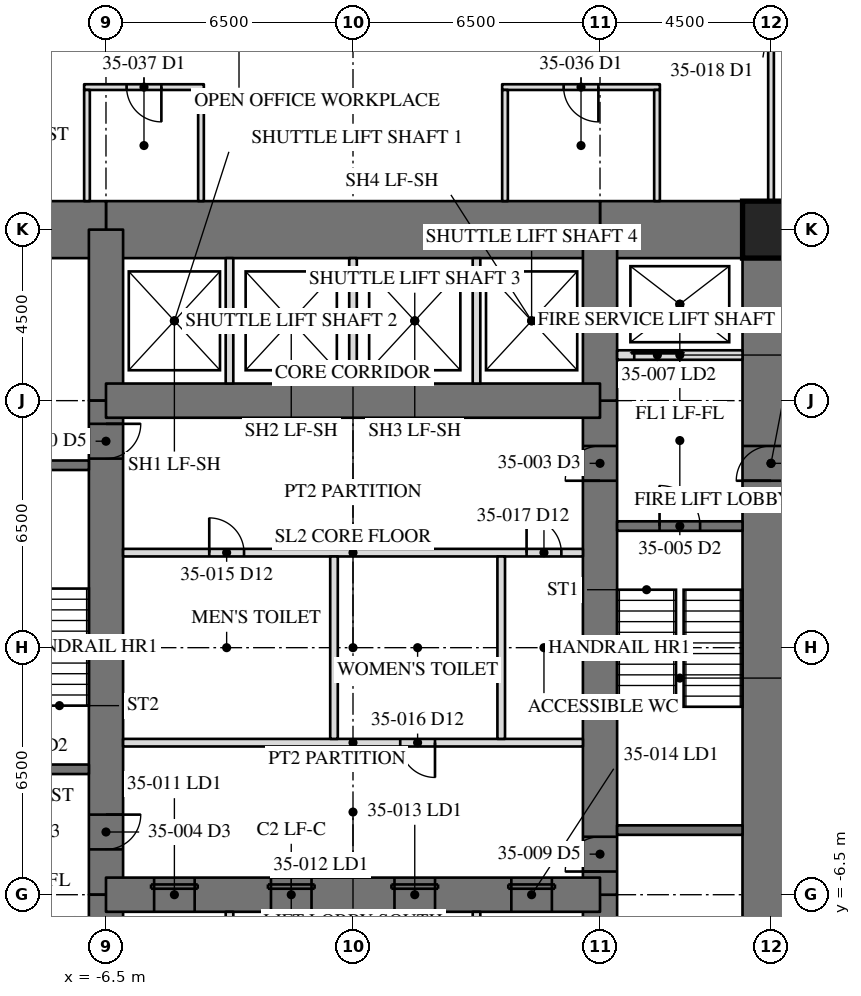
"""IFC4 building model, lengths in metres.
Left out: names, types, materials, properties, quantities, classifications, styles, units other than length and angle.
Written with IfcOpenShell. Run it as: python <this file> out.ifc"""

import sys

from ifc_helpers import new_model, si_unit, direction, frame, frame_2d, origin, origin_2d, place, context, subcontext, project, spatial, rectangle, hollow_rectangle, extrude, element, fill, save


model = new_model("IFC4")
c1 = context("Model", 3, precision=1e-05, world=origin(), true_north=direction((0.0, 1.0)))
c2 = subcontext(c1, "Body", "Model", "MODEL_VIEW")
j1 = project(units=[si_unit("LENGTHUNIT", "METRE"), si_unit("PLANEANGLEUNIT", "RADIAN")], contexts=[c1])
p1 = place(None, origin())
s1 = spatial("IfcSite", under=j1, at=p1, CompositionType="ELEMENT")
p2 = place(p1, origin())
s2 = spatial("IfcBuilding", under=s1, at=p2, CompositionType="ELEMENT")
p3 = place(p2, frame((0.0, 0.0, 150.0)))
s3 = spatial("IfcBuildingStorey", under=s2, at=p3, CompositionType="ELEMENT", Elevation=150.0)
p4 = place(p3, frame((11.0, -11.0, 0.0), z_axis=(0.0, 0.0, 1.0), x_axis=(0.0, 1.0, 0.0)))
e1 = element("IfcWall", 1, at=p4, inside=s3, PredefinedType="SHEAR", context=c2, shape_type="SweptSolid", body=[
    extrude(rectangle(XDim=22.0, YDim=1.5, at=frame_2d((11.0, 0.0))), origin(), (0.0, 0.0, 1.0), 4.1),
])
p5 = place(p4, frame((15.393, 0.0, 0.0)))
e2 = element("IfcOpeningElement", 2, at=p5, cuts=e1, PredefinedType="OPENING", context=c2, shape_type="SweptSolid", body=[
    extrude(rectangle(XDim=0.915, YDim=2.134, at=frame_2d((0.458, 1.067))), frame((0.0, 0.76, 0.0), z_axis=(0.0, -1.0, 0.0), x_axis=(1.0, 0.0, 0.0)), (0.0, 0.0, 1.0), 1.52),
])
p6 = place(p3, frame((11.0, 11.0, 0.0), z_axis=(0.0, 0.0, 1.0), x_axis=(-1.0, 0.0, 0.0)))
e3 = element("IfcWall", 3, at=p6, inside=s3, PredefinedType="SHEAR", context=c2, shape_type="SweptSolid", body=[
    extrude(rectangle(XDim=4.5, YDim=1.5, at=frame_2d((2.25, 0.0))), origin(), (0.0, 0.0, 1.0), 4.1),
])
p7 = place(p3, frame((6.5, 11.0, 0.0), z_axis=(0.0, 0.0, 1.0), x_axis=(-1.0, 0.0, 0.0)))
e4 = element("IfcWall", 4, at=p7, inside=s3, PredefinedType="SHEAR", context=c2, shape_type="SweptSolid", body=[
    extrude(rectangle(XDim=13.0, YDim=1.5, at=frame_2d((6.5, 0.0))), origin(), (0.0, 0.0, 1.0), 4.1),
])
p8 = place(p3, frame((-6.5, 11.0, 0.0), z_axis=(0.0, 0.0, 1.0), x_axis=(-1.0, 0.0, 0.0)))
e5 = element("IfcWall", 5, at=p8, inside=s3, PredefinedType="SHEAR", context=c2, shape_type="SweptSolid", body=[
    extrude(rectangle(XDim=4.5, YDim=1.5, at=frame_2d((2.25, 0.0))), origin(), (0.0, 0.0, 1.0), 4.1),
])
p9 = place(p3, frame((6.5, -11.0, 0.0), z_axis=(0.0, 0.0, 1.0), x_axis=(0.0, 1.0, 0.0)))
e6 = element("IfcWall", 6, at=p9, inside=s3, PredefinedType="SHEAR", context=c2, shape_type="SweptSolid", body=[
    extrude(rectangle(XDim=4.5, YDim=0.9, at=frame_2d((2.25, 0.0))), origin(), (0.0, 0.0, 1.0), 4.1),
])
p10 = place(p3, frame((6.5, -6.5, 0.0), z_axis=(0.0, 0.0, 1.0), x_axis=(0.0, 1.0, 0.0)))
e7 = element("IfcWall", 7, at=p10, inside=s3, PredefinedType="SHEAR", context=c2, shape_type="SweptSolid", body=[
    extrude(rectangle(XDim=13.0, YDim=0.9, at=frame_2d((6.5, 0.0))), origin(), (0.0, 0.0, 1.0), 4.1),
])
p11 = place(p10, frame((10.893, 0.0, 0.0)))
e8 = element("IfcOpeningElement", 8, at=p11, cuts=e7, PredefinedType="OPENING", context=c2, shape_type="SweptSolid", body=[
    extrude(rectangle(XDim=0.915, YDim=2.134, at=frame_2d((0.458, 1.067))), frame((0.0, 0.46, 0.0), z_axis=(0.0, -1.0, 0.0), x_axis=(1.0, 0.0, 0.0)), (0.0, 0.0, 1.0), 0.92),
])
p12 = place(p10, frame((0.61, 0.0, 0.0)))
e9 = element("IfcOpeningElement", 9, at=p12, cuts=e7, PredefinedType="OPENING", context=c2, shape_type="SweptSolid", body=[
    extrude(rectangle(XDim=0.915, YDim=2.134, at=frame_2d((0.458, 1.067))), frame((0.0, 0.46, 0.0), z_axis=(0.0, -1.0, 0.0), x_axis=(1.0, 0.0, 0.0)), (0.0, 0.0, 1.0), 0.92),
])
for number, where, z_axis, x_axis in (
    (10, (6.5, 6.5, 0.0), (0.0, 0.0, 1.0), (0.0, 1.0, 0.0)),
    (11, (-6.5, 11.0, 0.0), (0.0, 0.0, 1.0), (0.0, -1.0, 0.0)),
):
    element("IfcWall", number, at=place(p3, frame(where, z_axis=z_axis, x_axis=x_axis)), inside=s3, PredefinedType="SHEAR", context=c2, shape_type="SweptSolid", body=[
        extrude(rectangle(XDim=4.5, YDim=0.9, at=frame_2d((2.25, 0.0))), origin(), (0.0, 0.0, 1.0), 4.1),
    ])
p13 = place(p3, frame((-6.5, 6.5, 0.0), z_axis=(0.0, 0.0, 1.0), x_axis=(0.0, -1.0, 0.0)))
e12 = element("IfcWall", 12, at=p13, inside=s3, PredefinedType="SHEAR", context=c2, shape_type="SweptSolid", body=[
    extrude(rectangle(XDim=13.0, YDim=0.9, at=frame_2d((6.5, 0.0))), origin(), (0.0, 0.0, 1.0), 4.1),
])
p14 = place(p13, frame((10.893, 0.0, 0.0)))
e13 = element("IfcOpeningElement", 13, at=p14, cuts=e12, PredefinedType="OPENING", context=c2, shape_type="SweptSolid", body=[
    extrude(rectangle(XDim=0.915, YDim=2.134, at=frame_2d((0.458, 1.067))), frame((0.0, 0.46, 0.0), z_axis=(0.0, -1.0, 0.0), x_axis=(1.0, 0.0, 0.0)), (0.0, 0.0, 1.0), 0.92),
])
p15 = place(p13, frame((0.61, 0.0, 0.0)))
e14 = element("IfcOpeningElement", 14, at=p15, cuts=e12, PredefinedType="OPENING", context=c2, shape_type="SweptSolid", body=[
    extrude(rectangle(XDim=0.915, YDim=2.134, at=frame_2d((0.458, 1.067))), frame((0.0, 0.46, 0.0), z_axis=(0.0, -1.0, 0.0), x_axis=(1.0, 0.0, 0.0)), (0.0, 0.0, 1.0), 0.92),
])
p16 = place(p3, frame((-6.5, -6.5, 0.0), z_axis=(0.0, 0.0, 1.0), x_axis=(0.0, -1.0, 0.0)))
e15 = element("IfcWall", 15, at=p16, inside=s3, PredefinedType="SHEAR", context=c2, shape_type="SweptSolid", body=[
    extrude(rectangle(XDim=4.5, YDim=0.9, at=frame_2d((2.25, 0.0))), origin(), (0.0, 0.0, 1.0), 4.1),
])
p17 = place(p3, frame((6.5, 6.5, 0.0), z_axis=(0.0, 0.0, 1.0), x_axis=(-1.0, 0.0, 0.0)))
e16 = element("IfcWall", 16, at=p17, inside=s3, PredefinedType="SHEAR", context=c2, shape_type="SweptSolid", body=[
    extrude(rectangle(XDim=13.0, YDim=0.9, at=frame_2d((6.5, 0.0))), origin(), (0.0, 0.0, 1.0), 4.1),
])
p18 = place(p3, frame((-6.5, -6.5, 0.0), z_axis=(0.0, 0.0, 1.0), x_axis=(1.0, 0.0, 0.0)))
e17 = element("IfcWall", 17, at=p18, inside=s3, PredefinedType="SHEAR", context=c2, shape_type="SweptSolid", body=[
    extrude(rectangle(XDim=13.0, YDim=0.9, at=frame_2d((6.5, 0.0))), origin(), (0.0, 0.0, 1.0), 4.1),
])
p19 = place(p18, frame((1.267, 0.0, 0.0)))
e18 = element("IfcOpeningElement", 18, at=p19, cuts=e17, PredefinedType="OPENING", context=c2, shape_type="SweptSolid", body=[
    extrude(rectangle(XDim=1.067, YDim=2.134, at=frame_2d((0.533, 1.067))), frame((0.0, 0.46, 0.0), z_axis=(0.0, -1.0, 0.0), x_axis=(1.0, 0.0, 0.0)), (0.0, 0.0, 1.0), 0.92),
])
p20 = place(p18, frame((4.342, 0.0, 0.0)))
e19 = element("IfcOpeningElement", 19, at=p20, cuts=e17, PredefinedType="OPENING", context=c2, shape_type="SweptSolid", body=[
    extrude(rectangle(XDim=1.067, YDim=2.134, at=frame_2d((0.533, 1.067))), frame((0.0, 0.46, 0.0), z_axis=(0.0, -1.0, 0.0), x_axis=(1.0, 0.0, 0.0)), (0.0, 0.0, 1.0), 0.92),
])
p21 = place(p18, frame((7.592, 0.0, 0.0)))
e20 = element("IfcOpeningElement", 20, at=p21, cuts=e17, PredefinedType="OPENING", context=c2, shape_type="SweptSolid", body=[
    extrude(rectangle(XDim=1.067, YDim=2.134, at=frame_2d((0.533, 1.067))), frame((0.0, 0.46, 0.0), z_axis=(0.0, -1.0, 0.0), x_axis=(1.0, 0.0, 0.0)), (0.0, 0.0, 1.0), 0.92),
])
p22 = place(p18, frame((10.667, 0.0, 0.0)))
e21 = element("IfcOpeningElement", 21, at=p22, cuts=e17, PredefinedType="OPENING", context=c2, shape_type="SweptSolid", body=[
    extrude(rectangle(XDim=1.067, YDim=2.134, at=frame_2d((0.533, 1.067))), frame((0.0, 0.46, 0.0), z_axis=(0.0, -1.0, 0.0), x_axis=(1.0, 0.0, 0.0)), (0.0, 0.0, 1.0), 0.92),
])
p23 = place(p3, frame((11.0, 11.0, 0.0), z_axis=(0.0, 0.0, 1.0), x_axis=(1.0, 0.0, 0.0)))
e22 = element("IfcColumn", 22, at=p23, inside=s3, PredefinedType="COLUMN", context=c2, shape_type="SweptSolid", body=[
    extrude(hollow_rectangle(XDim=1.499, YDim=1.499, WallThickness=0.102, at=origin_2d()), origin(), (0.0, 0.0, 1.0), 4.1),
])
for number, where, z_axis, x_axis in (
    (23, (6.95, -4.8, 0.0), (0.0, 0.0, 1.0), (1.0, 0.0, 0.0)),
    (24, (-6.95, 4.8, 0.0), (0.0, 0.0, 1.0), (-1.0, 0.0, 0.0)),
):
    element("IfcWall", number, at=place(p3, frame(where, z_axis=z_axis, x_axis=x_axis)), inside=s3, PredefinedType="SOLIDWALL", context=c2, shape_type="SweptSolid", body=[
        extrude(rectangle(XDim=3.3, YDim=0.25, at=frame_2d((1.65, 0.0))), origin(), (0.0, 0.0, 1.0), 3.91),
    ])
p24 = place(p3, frame((6.95, 3.2, 0.0), z_axis=(0.0, 0.0, 1.0), x_axis=(1.0, 0.0, 0.0)))
e25 = element("IfcWall", 25, at=p24, inside=s3, PredefinedType="SOLIDWALL", context=c2, shape_type="SweptSolid", body=[
    extrude(rectangle(XDim=3.3, YDim=0.25, at=frame_2d((1.65, 0.0))), origin(), (0.0, 0.0, 1.0), 3.91),
])
p25 = place(p24, frame((1.116, 0.0, 0.0)))
e26 = element("IfcOpeningElement", 26, at=p25, cuts=e25, PredefinedType="OPENING", context=c2, shape_type="SweptSolid", body=[
    extrude(rectangle(XDim=1.067, YDim=2.134, at=frame_2d((0.533, 1.067))), frame((0.0, 0.135, 0.0), z_axis=(0.0, -1.0, 0.0), x_axis=(1.0, 0.0, 0.0)), (0.0, 0.0, 1.0), 0.27),
])
p26 = place(p3, frame((-6.95, -3.2, 0.0), z_axis=(0.0, 0.0, 1.0), x_axis=(-1.0, 0.0, 0.0)))
e27 = element("IfcWall", 27, at=p26, inside=s3, PredefinedType="SOLIDWALL", context=c2, shape_type="SweptSolid", body=[
    extrude(rectangle(XDim=3.3, YDim=0.25, at=frame_2d((1.65, 0.0))), origin(), (0.0, 0.0, 1.0), 3.91),
])
p27 = place(p26, frame((1.116, 0.0, 0.0)))
e28 = element("IfcOpeningElement", 28, at=p27, cuts=e27, PredefinedType="OPENING", context=c2, shape_type="SweptSolid", body=[
    extrude(rectangle(XDim=1.067, YDim=2.134, at=frame_2d((0.533, 1.067))), frame((0.0, 0.135, 0.0), z_axis=(0.0, -1.0, 0.0), x_axis=(1.0, 0.0, 0.0)), (0.0, 0.0, 1.0), 0.27),
])
p28 = place(p3, frame((6.95, 7.7, 0.0), z_axis=(0.0, 0.0, 1.0), x_axis=(1.0, 0.0, 0.0)))
e29 = element("IfcWall", 29, at=p28, inside=s3, PredefinedType="PARTITIONING", context=c2, shape_type="SweptSolid", body=[
    extrude(rectangle(XDim=3.3, YDim=0.25, at=frame_2d((1.65, 0.0))), origin(), (0.0, 0.0, 1.0), 3.91),
])
p29 = place(p28, frame((0.45, 0.0, 0.0)))
e30 = element("IfcOpeningElement", 30, at=p29, cuts=e29, PredefinedType="OPENING", context=c2, shape_type="SweptSolid", body=[
    extrude(rectangle(XDim=1.219, YDim=2.134, at=frame_2d((0.609, 1.067))), frame((0.0, 0.135, 0.0), z_axis=(0.0, -1.0, 0.0), x_axis=(1.0, 0.0, 0.0)), (0.0, 0.0, 1.0), 0.27),
])
p30 = place(p3, frame((-6.05, 2.5, 0.0), z_axis=(0.0, 0.0, 1.0), x_axis=(1.0, 0.0, 0.0)))
e31 = element("IfcWall", 31, at=p30, inside=s3, PredefinedType="PARTITIONING", context=c2, shape_type="SweptSolid", body=[
    extrude(rectangle(XDim=12.1, YDim=0.2, at=frame_2d((6.05, 0.0))), origin(), (0.0, 0.0, 1.0), 3.91),
])
p31 = place(p30, frame((2.268, 0.0, 0.0)))
e32 = element("IfcOpeningElement", 32, at=p31, cuts=e31, PredefinedType="OPENING", context=c2, shape_type="SweptSolid", body=[
    extrude(rectangle(XDim=0.915, YDim=2.134, at=frame_2d((0.458, 1.067))), frame((0.0, 0.11, 0.0), z_axis=(0.0, -1.0, 0.0), x_axis=(1.0, 0.0, 0.0)), (0.0, 0.0, 1.0), 0.22),
])
p32 = place(p30, frame((10.617, 0.0, 0.0)))
e33 = element("IfcOpeningElement", 33, at=p32, cuts=e31, PredefinedType="OPENING", context=c2, shape_type="SweptSolid", body=[
    extrude(rectangle(XDim=0.915, YDim=2.134, at=frame_2d((0.458, 1.067))), frame((0.0, 0.11, 0.0), z_axis=(0.0, -1.0, 0.0), x_axis=(1.0, 0.0, 0.0)), (0.0, 0.0, 1.0), 0.22),
])
p33 = place(p3, frame((6.05, -2.5, 0.0), z_axis=(0.0, 0.0, 1.0), x_axis=(-1.0, 0.0, 0.0)))
e34 = element("IfcWall", 34, at=p33, inside=s3, PredefinedType="PARTITIONING", context=c2, shape_type="SweptSolid", body=[
    extrude(rectangle(XDim=12.1, YDim=0.2, at=frame_2d((6.05, 0.0))), origin(), (0.0, 0.0, 1.0), 3.91),
])
p34 = place(p33, frame((3.893, 0.0, 0.0)))
e35 = element("IfcOpeningElement", 35, at=p34, cuts=e34, PredefinedType="OPENING", context=c2, shape_type="SweptSolid", body=[
    extrude(rectangle(XDim=0.915, YDim=2.134, at=frame_2d((0.458, 1.067))), frame((0.0, 0.11, 0.0), z_axis=(0.0, -1.0, 0.0), x_axis=(1.0, 0.0, 0.0)), (0.0, 0.0, 1.0), 0.22),
])
for number, where, z_axis, x_axis in (
    (36, (-3.25, 6.95, 0.0), (0.0, 0.0, 1.0), (0.0, 1.0, 0.0)),
    (37, (0.0, 6.95, 0.0), (0.0, 0.0, 1.0), (0.0, 1.0, 0.0)),
    (38, (3.25, 6.95, 0.0), (0.0, 0.0, 1.0), (0.0, 1.0, 0.0)),
    (39, (-3.25, -10.25, 0.0), (0.0, 0.0, 1.0), (0.0, 1.0, 0.0)),
    (40, (0.0, -10.25, 0.0), (0.0, 0.0, 1.0), (0.0, 1.0, 0.0)),
    (41, (3.25, -10.25, 0.0), (0.0, 0.0, 1.0), (0.0, 1.0, 0.0)),
):
    element("IfcWall", number, at=place(p3, frame(where, z_axis=z_axis, x_axis=x_axis)), inside=s3, PredefinedType="PARTITIONING", context=c2, shape_type="SweptSolid", body=[
        extrude(rectangle(XDim=3.3, YDim=0.2, at=frame_2d((1.65, 0.0))), origin(), (0.0, 0.0, 1.0), 3.91),
    ])
for number, where, z_axis, x_axis in (
    (42, (-0.5, -2.4, 0.0), (0.0, 0.0, 1.0), (0.0, 1.0, 0.0)),
    (43, (3.9, -2.4, 0.0), (0.0, 0.0, 1.0), (0.0, 1.0, 0.0)),
):
    element("IfcWall", number, at=place(p3, frame(where, z_axis=z_axis, x_axis=x_axis)), inside=s3, PredefinedType="PARTITIONING", context=c2, shape_type="SweptSolid", body=[
        extrude(rectangle(XDim=4.8, YDim=0.2, at=frame_2d((2.4, 0.0))), origin(), (0.0, 0.0, 1.0), 3.91),
    ])
p35 = place(p3, frame((11.0, 11.75, 0.0), z_axis=(0.0, 0.0, 1.0), x_axis=(0.0, 1.0, 0.0)))
e44 = element("IfcWall", 44, at=p35, inside=s3, PredefinedType="PARTITIONING", context=c2, shape_type="SweptSolid", body=[
    extrude(rectangle(XDim=10.665, YDim=0.15, at=frame_2d((5.333, 0.0))), origin(), (0.0, 0.0, 1.0), 3.326),
])
p36 = place(p35, frame((4.518, 0.0, 0.0)))
e45 = element("IfcOpeningElement", 45, at=p36, cuts=e44, PredefinedType="OPENING", context=c2, shape_type="SweptSolid", body=[
    extrude(rectangle(XDim=0.915, YDim=2.134, at=frame_2d((0.458, 1.067))), frame((0.0, 0.085, 0.0), z_axis=(0.0, -1.0, 0.0), x_axis=(1.0, 0.0, 0.0)), (0.0, 0.0, 1.0), 0.17),
])
p37 = place(p3, frame((8.075, 14.75, 0.0), z_axis=(0.0, 0.0, 1.0), x_axis=(-1.0, 0.0, 0.0)))
e46 = element("IfcWall", 46, at=p37, inside=s3, PredefinedType="PARTITIONING", context=c2, shape_type="SweptSolid", body=[
    extrude(rectangle(XDim=4.15, YDim=0.15, at=frame_2d((2.075, 0.0))), origin(), (0.0, 0.0, 1.0), 3.91),
])
p38 = place(p37, frame((1.617, 0.0, 0.0)))
e47 = element("IfcOpeningElement", 47, at=p38, cuts=e46, PredefinedType="OPENING", context=c2, shape_type="SweptSolid", body=[
    extrude(rectangle(XDim=0.915, YDim=2.134, at=frame_2d((0.458, 1.067))), frame((0.0, 0.085, 0.0), z_axis=(0.0, -1.0, 0.0), x_axis=(1.0, 0.0, 0.0)), (0.0, 0.0, 1.0), 0.17),
])
for number, where, z_axis, x_axis in (
    (48, (8.0, 14.675, 0.0), (0.0, 0.0, 1.0), (0.0, -1.0, 0.0)),
    (49, (4.0, 14.675, 0.0), (0.0, 0.0, 1.0), (0.0, -1.0, 0.0)),
):
    element("IfcWall", number, at=place(p3, frame(where, z_axis=z_axis, x_axis=x_axis)), inside=s3, PredefinedType="PARTITIONING", context=c2, shape_type="SweptSolid", body=[
        extrude(rectangle(XDim=2.925, YDim=0.15, at=frame_2d((1.462, 0.0))), origin(), (0.0, 0.0, 1.0), 3.91),
    ])
p39 = place(p3, frame((-3.925, 14.75, 0.0), z_axis=(0.0, 0.0, 1.0), x_axis=(-1.0, 0.0, 0.0)))
e50 = element("IfcWall", 50, at=p39, inside=s3, PredefinedType="PARTITIONING", context=c2, shape_type="SweptSolid", body=[
    extrude(rectangle(XDim=3.15, YDim=0.15, at=frame_2d((1.575, 0.0))), origin(), (0.0, 0.0, 1.0), 3.91),
])
p40 = place(p39, frame((1.117, 0.0, 0.0)))
e51 = element("IfcOpeningElement", 51, at=p40, cuts=e50, PredefinedType="OPENING", context=c2, shape_type="SweptSolid", body=[
    extrude(rectangle(XDim=0.915, YDim=2.134, at=frame_2d((0.458, 1.067))), frame((0.0, 0.085, 0.0), z_axis=(0.0, -1.0, 0.0), x_axis=(1.0, 0.0, 0.0)), (0.0, 0.0, 1.0), 0.17),
])
for number, where, z_axis, x_axis in (
    (52, (-4.0, 14.675, 0.0), (0.0, 0.0, 1.0), (0.0, -1.0, 0.0)),
    (53, (-7.0, 14.675, 0.0), (0.0, 0.0, 1.0), (0.0, -1.0, 0.0)),
):
    element("IfcWall", number, at=place(p3, frame(where, z_axis=z_axis, x_axis=x_axis)), inside=s3, PredefinedType="PARTITIONING", context=c2, shape_type="SweptSolid", body=[
        extrude(rectangle(XDim=2.925, YDim=0.15, at=frame_2d((1.462, 0.0))), origin(), (0.0, 0.0, 1.0), 3.91),
    ])
p41 = place(p11, origin())
e54 = element("IfcDoor", 54, at=p41, inside=s3, OperationType="SINGLE_SWING_RIGHT", PredefinedType="DOOR", context=c2, shape_type="SweptSolid", body=[
    extrude(rectangle(XDim=0.915, YDim=2.134, at=frame_2d((0.458, 1.067))), frame((0.0, -0.375, 0.0), z_axis=(0.0, -1.0, 0.0), x_axis=(1.0, 0.0, 0.0)), (0.0, 0.0, 1.0), 0.05),
])
fill(e8, e54)
p42 = place(p14, origin())
e55 = element("IfcDoor", 55, at=p42, inside=s3, OperationType="SINGLE_SWING_RIGHT", PredefinedType="DOOR", context=c2, shape_type="SweptSolid", body=[
    extrude(rectangle(XDim=0.915, YDim=2.134, at=frame_2d((0.458, 1.067))), frame((0.0, -0.375, 0.0), z_axis=(0.0, -1.0, 0.0), x_axis=(1.0, 0.0, 0.0)), (0.0, 0.0, 1.0), 0.05),
])
fill(e13, e55)
p43 = place(p25, origin())
e56 = element("IfcDoor", 56, at=p43, inside=s3, OperationType="SINGLE_SWING_LEFT", PredefinedType="DOOR", context=c2, shape_type="SweptSolid", body=[
    extrude(rectangle(XDim=1.067, YDim=2.134, at=frame_2d((0.533, 1.067))), frame((0.0, 0.025, 0.0), z_axis=(0.0, -1.0, 0.0), x_axis=(1.0, 0.0, 0.0)), (0.0, 0.0, 1.0), 0.05),
])
fill(e26, e56)
p44 = place(p29, origin())
e57 = element("IfcDoor", 57, at=p44, inside=s3, OperationType="SLIDING_TO_LEFT", PredefinedType="DOOR", context=c2, shape_type="SweptSolid", body=[
    extrude(rectangle(XDim=1.219, YDim=2.134, at=frame_2d((0.609, 1.067))), frame((0.0, 0.025, 0.0), z_axis=(0.0, -1.0, 0.0), x_axis=(1.0, 0.0, 0.0)), (0.0, 0.0, 1.0), 0.05),
])
fill(e30, e57)
p45 = place(p12, origin())
e58 = element("IfcDoor", 58, at=p45, inside=s3, OperationType="SINGLE_SWING_RIGHT", PredefinedType="DOOR", context=c2, shape_type="SweptSolid", body=[
    extrude(rectangle(XDim=0.915, YDim=2.134, at=frame_2d((0.458, 1.067))), frame((0.0, -0.375, 0.0), z_axis=(0.0, -1.0, 0.0), x_axis=(1.0, 0.0, 0.0)), (0.0, 0.0, 1.0), 0.05),
])
fill(e9, e58)
p46 = place(p15, origin())
e59 = element("IfcDoor", 59, at=p46, inside=s3, OperationType="SINGLE_SWING_RIGHT", PredefinedType="DOOR", context=c2, shape_type="SweptSolid", body=[
    extrude(rectangle(XDim=0.915, YDim=2.134, at=frame_2d((0.458, 1.067))), frame((0.0, -0.375, 0.0), z_axis=(0.0, -1.0, 0.0), x_axis=(1.0, 0.0, 0.0)), (0.0, 0.0, 1.0), 0.05),
])
fill(e14, e59)
p47 = place(p19, origin())
e60 = element("IfcDoor", 60, at=p47, inside=s3, OperationType="SLIDING_TO_LEFT", PredefinedType="DOOR", context=c2, shape_type="SweptSolid", body=[
    extrude(rectangle(XDim=1.067, YDim=2.134, at=frame_2d((0.533, 1.067))), frame((0.0, -0.375, 0.0), z_axis=(0.0, -1.0, 0.0), x_axis=(1.0, 0.0, 0.0)), (0.0, 0.0, 1.0), 0.05),
])
fill(e18, e60)
p48 = place(p20, origin())
e61 = element("IfcDoor", 61, at=p48, inside=s3, OperationType="SLIDING_TO_LEFT", PredefinedType="DOOR", context=c2, shape_type="SweptSolid", body=[
    extrude(rectangle(XDim=1.067, YDim=2.134, at=frame_2d((0.533, 1.067))), frame((0.0, -0.375, 0.0), z_axis=(0.0, -1.0, 0.0), x_axis=(1.0, 0.0, 0.0)), (0.0, 0.0, 1.0), 0.05),
])
fill(e19, e61)
p49 = place(p21, origin())
e62 = element("IfcDoor", 62, at=p49, inside=s3, OperationType="SLIDING_TO_LEFT", PredefinedType="DOOR", context=c2, shape_type="SweptSolid", body=[
    extrude(rectangle(XDim=1.067, YDim=2.134, at=frame_2d((0.533, 1.067))), frame((0.0, -0.375, 0.0), z_axis=(0.0, -1.0, 0.0), x_axis=(1.0, 0.0, 0.0)), (0.0, 0.0, 1.0), 0.05),
])
fill(e20, e62)
p50 = place(p22, origin())
e63 = element("IfcDoor", 63, at=p50, inside=s3, OperationType="SLIDING_TO_LEFT", PredefinedType="DOOR", context=c2, shape_type="SweptSolid", body=[
    extrude(rectangle(XDim=1.067, YDim=2.134, at=frame_2d((0.533, 1.067))), frame((0.0, -0.375, 0.0), z_axis=(0.0, -1.0, 0.0), x_axis=(1.0, 0.0, 0.0)), (0.0, 0.0, 1.0), 0.05),
])
fill(e21, e63)
p51 = place(p31, origin())
e64 = element("IfcDoor", 64, at=p51, inside=s3, OperationType="SINGLE_SWING_LEFT", PredefinedType="DOOR", context=c2, shape_type="SweptSolid", body=[
    extrude(rectangle(XDim=0.915, YDim=2.134, at=frame_2d((0.458, 1.067))), frame((0.0, 0.025, 0.0), z_axis=(0.0, -1.0, 0.0), x_axis=(1.0, 0.0, 0.0)), (0.0, 0.0, 1.0), 0.05),
])
fill(e32, e64)
p52 = place(p34, origin())
e65 = element("IfcDoor", 65, at=p52, inside=s3, OperationType="SINGLE_SWING_LEFT", PredefinedType="DOOR", context=c2, shape_type="SweptSolid", body=[
    extrude(rectangle(XDim=0.915, YDim=2.134, at=frame_2d((0.458, 1.067))), frame((0.0, 0.025, 0.0), z_axis=(0.0, -1.0, 0.0), x_axis=(1.0, 0.0, 0.0)), (0.0, 0.0, 1.0), 0.05),
])
fill(e35, e65)
p53 = place(p32, origin())
e66 = element("IfcDoor", 66, at=p53, inside=s3, OperationType="SINGLE_SWING_LEFT", PredefinedType="DOOR", context=c2, shape_type="SweptSolid", body=[
    extrude(rectangle(XDim=0.915, YDim=2.134, at=frame_2d((0.458, 1.067))), frame((0.0, 0.025, 0.0), z_axis=(0.0, -1.0, 0.0), x_axis=(1.0, 0.0, 0.0)), (0.0, 0.0, 1.0), 0.05),
])
fill(e33, e66)
p54 = place(p38, origin())
e67 = element("IfcDoor", 67, at=p54, inside=s3, OperationType="SINGLE_SWING_LEFT", PredefinedType="DOOR", context=c2, shape_type="SweptSolid", body=[
    extrude(rectangle(XDim=0.915, YDim=2.134, at=frame_2d((0.458, 1.067))), frame((0.0, 0.025, 0.0), z_axis=(0.0, -1.0, 0.0), x_axis=(1.0, 0.0, 0.0)), (0.0, 0.0, 1.0), 0.05),
])
fill(e47, e67)
p55 = place(p40, origin())
e68 = element("IfcDoor", 68, at=p55, inside=s3, OperationType="SINGLE_SWING_LEFT", PredefinedType="DOOR", context=c2, shape_type="SweptSolid", body=[
    extrude(rectangle(XDim=0.915, YDim=2.134, at=frame_2d((0.458, 1.067))), frame((0.0, 0.025, 0.0), z_axis=(0.0, -1.0, 0.0), x_axis=(1.0, 0.0, 0.0)), (0.0, 0.0, 1.0), 0.05),
])
fill(e51, e68)
save(model, sys.argv[1])
